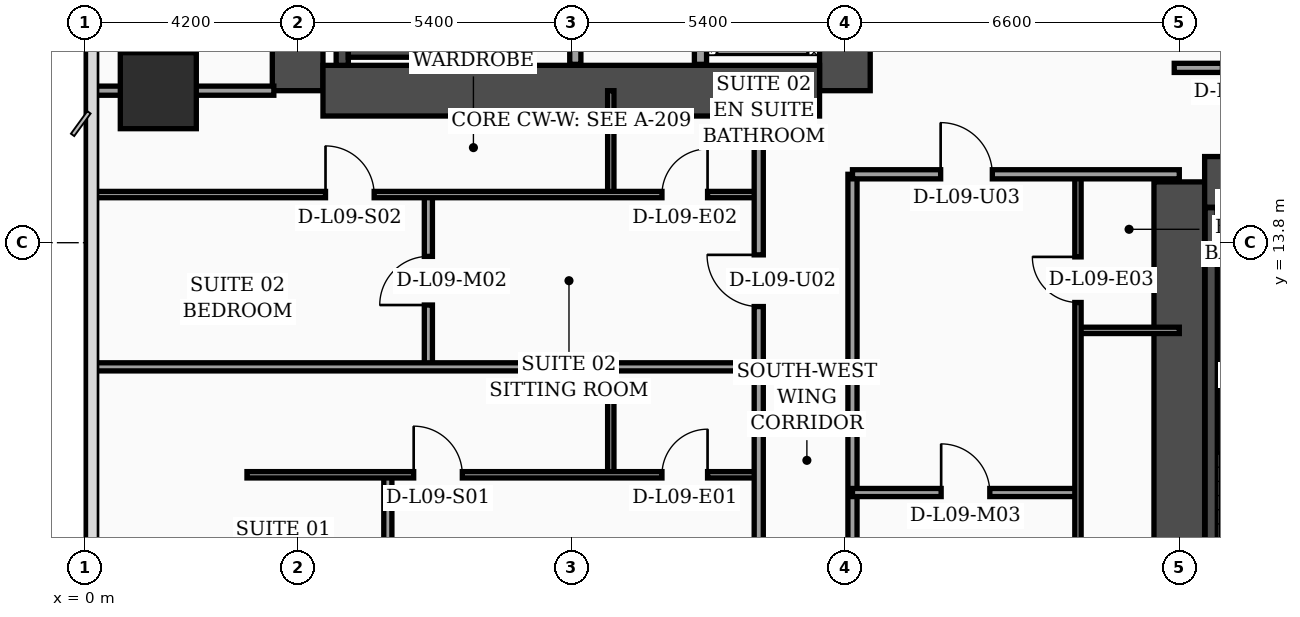
"""IFC4 building model, lengths in metres.
Left out: names, types, materials, properties, quantities, classifications, styles, units other than length and angle.
Written with IfcOpenShell. Run it as: python <this file> out.ifc"""

import sys

from ifc_helpers import new_model, si_unit, direction, frame, frame_2d, origin, origin_2d, place, context, subcontext, project, spatial, rectangle, extrude, element, fill, save


model = new_model("IFC4")
c1 = context("Model", 3, precision=1e-05, world=origin(), true_north=direction((0.0, 1.0)))
c2 = subcontext(c1, "Body", "Model", "MODEL_VIEW")
j1 = project(units=[si_unit("LENGTHUNIT", "METRE"), si_unit("PLANEANGLEUNIT", "RADIAN")], contexts=[c1])
p1 = place(None, origin())
s1 = spatial("IfcSite", under=j1, at=p1, CompositionType="ELEMENT")
p2 = place(p1, origin())
s2 = spatial("IfcBuilding", under=s1, at=p2, CompositionType="ELEMENT")
p3 = place(p2, frame((0.0, 0.0, 42.2)))
s3 = spatial("IfcBuildingStorey", under=s2, at=p3, CompositionType="ELEMENT", Elevation=42.2)
p4 = place(p3, frame((4.2, 16.8, 0.0), z_axis=(0.0, 0.0, 1.0), x_axis=(0.0, 1.0, 0.0)))
e1 = element("IfcWall", 1, at=p4, inside=s3, PredefinedType="SHEAR", context=c2, shape_type="SweptSolid", body=[
    extrude(rectangle(XDim=21.6, YDim=1.0, at=frame_2d((10.8, 0.0))), origin(), (0.0, 0.0, 1.0), 3.52),
])
p5 = place(p3, frame((15.0, 16.8, 0.0), z_axis=(0.0, 0.0, 1.0), x_axis=(0.0, 1.0, 0.0)))
e2 = element("IfcWall", 2, at=p5, inside=s3, PredefinedType="SHEAR", context=c2, shape_type="SweptSolid", body=[
    extrude(rectangle(XDim=21.6, YDim=1.0, at=frame_2d((10.8, 0.0))), origin(), (0.0, 0.0, 1.0), 3.52),
])
p6 = place(p5, frame((8.65, 0.0, 0.0)))
e3 = element("IfcOpeningElement", 3, at=p6, cuts=e2, PredefinedType="OPENING", context=c2, shape_type="SweptSolid", body=[
    extrude(rectangle(XDim=1.1, YDim=2.2, at=frame_2d((0.55, 1.1))), frame((0.0, 0.51, 0.0), z_axis=(0.0, -1.0, 0.0), x_axis=(1.0, 0.0, 0.0)), (0.0, 0.0, 1.0), 1.02),
])
p7 = place(p5, frame((1.25, 0.0, 0.0)))
e4 = element("IfcOpeningElement", 4, at=p7, cuts=e2, PredefinedType="OPENING", context=c2, shape_type="SweptSolid", body=[
    extrude(rectangle(XDim=1.1, YDim=2.2, at=frame_2d((0.55, 1.1))), frame((0.0, 0.51, 0.0), z_axis=(0.0, -1.0, 0.0), x_axis=(1.0, 0.0, 0.0)), (0.0, 0.0, 1.0), 1.02),
])
p8 = place(p5, frame((3.8, 0.0, 0.0)))
e5 = element("IfcOpeningElement", 5, at=p8, cuts=e2, PredefinedType="OPENING", context=c2, shape_type="SweptSolid", body=[
    extrude(rectangle(XDim=1.1, YDim=2.2, at=frame_2d((0.55, 1.1))), frame((0.0, 0.51, 0.0), z_axis=(0.0, -1.0, 0.0), x_axis=(1.0, 0.0, 0.0)), (0.0, 0.0, 1.0), 1.02),
])
p9 = place(p5, frame((6.35, 0.0, 0.0)))
e6 = element("IfcOpeningElement", 6, at=p9, cuts=e2, PredefinedType="OPENING", context=c2, shape_type="SweptSolid", body=[
    extrude(rectangle(XDim=1.1, YDim=2.2, at=frame_2d((0.55, 1.1))), frame((0.0, 0.51, 0.0), z_axis=(0.0, -1.0, 0.0), x_axis=(1.0, 0.0, 0.0)), (0.0, 0.0, 1.0), 1.02),
])
p10 = place(p3, frame((4.7, 16.8, 0.0), z_axis=(0.0, 0.0, 1.0), x_axis=(1.0, 0.0, 0.0)))
e7 = element("IfcWall", 7, at=p10, inside=s3, PredefinedType="SHEAR", context=c2, shape_type="SweptSolid", body=[
    extrude(rectangle(XDim=9.8, YDim=1.0, at=frame_2d((4.9, 0.0))), origin(), (0.0, 0.0, 1.0), 3.52),
])
p11 = place(p3, frame((21.6, 4.6, 0.0), z_axis=(0.0, 0.0, 1.0), x_axis=(0.0, 1.0, 0.0)))
e8 = element("IfcWall", 8, at=p11, inside=s3, PredefinedType="SHEAR", context=c2, shape_type="SweptSolid", body=[
    extrude(rectangle(XDim=10.4, YDim=1.0, at=frame_2d((5.2, 0.0))), origin(), (0.0, 0.0, 1.0), 3.52),
])
p12 = place(p3, frame((22.1, 15.0, 0.0), z_axis=(0.0, 0.0, 1.0), x_axis=(1.0, 0.0, 0.0)))
e9 = element("IfcWall", 9, at=p12, inside=s3, PredefinedType="SHEAR", context=c2, shape_type="SweptSolid", body=[
    extrude(rectangle(XDim=9.8, YDim=1.0, at=frame_2d((4.9, 0.0))), origin(), (0.0, 0.0, 1.0), 3.52),
])
p13 = place(p12, frame((4.8, 0.0, 0.0)))
e10 = element("IfcOpeningElement", 10, at=p13, cuts=e9, PredefinedType="OPENING", context=c2, shape_type="SweptSolid", body=[
    extrude(rectangle(XDim=1.1, YDim=2.2, at=frame_2d((0.55, 1.1))), frame((0.0, 0.51, 0.0), z_axis=(0.0, -1.0, 0.0), x_axis=(1.0, 0.0, 0.0)), (0.0, 0.0, 1.0), 1.02),
])
p14 = place(p3, frame((5.08, 17.3, 0.0), z_axis=(0.0, 0.0, 1.0), x_axis=(0.0, 1.0, 0.0)))
e11 = element("IfcWall", 11, at=p14, inside=s3, PredefinedType="SOLIDWALL", context=c2, shape_type="SweptSolid", body=[
    extrude(rectangle(XDim=9.49, YDim=0.24, at=frame_2d((4.745, 0.0))), origin(), (0.0, 0.0, 1.0), 3.52),
])
p15 = place(p3, frame((8.42, 17.3, 0.0), z_axis=(0.0, 0.0, 1.0), x_axis=(0.0, 1.0, 0.0)))
e12 = element("IfcWall", 12, at=p15, inside=s3, PredefinedType="SOLIDWALL", context=c2, shape_type="SweptSolid", body=[
    extrude(rectangle(XDim=9.49, YDim=0.24, at=frame_2d((4.745, 0.0))), origin(), (0.0, 0.0, 1.0), 3.52),
])
p16 = place(p15, frame((0.35, 0.0, 0.0)))
e13 = element("IfcOpeningElement", 13, at=p16, cuts=e12, PredefinedType="OPENING", context=c2, shape_type="SweptSolid", body=[
    extrude(rectangle(XDim=1.15, YDim=2.2, at=frame_2d((0.575, 1.1))), frame((0.0, 0.13, 0.0), z_axis=(0.0, -1.0, 0.0), x_axis=(1.0, 0.0, 0.0)), (0.0, 0.0, 1.0), 0.26),
])
p17 = place(p3, frame((5.2, 17.58, 0.0), z_axis=(0.0, 0.0, 1.0), x_axis=(1.0, 0.0, 0.0)))
e14 = element("IfcWall", 14, at=p17, inside=s3, PredefinedType="SOLIDWALL", context=c2, shape_type="SweptSolid", body=[
    extrude(rectangle(XDim=3.1, YDim=0.24, at=frame_2d((1.55, 0.0))), origin(), (0.0, 0.0, 1.0), 3.52),
])
p18 = place(p3, frame((22.23, 5.1, 0.0), z_axis=(0.0, 0.0, 1.0), x_axis=(0.0, 1.0, 0.0)))
e15 = element("IfcWall", 15, at=p18, inside=s3, PredefinedType="SOLIDWALL", context=c2, shape_type="SweptSolid", body=[
    extrude(rectangle(XDim=9.39, YDim=0.24, at=frame_2d((4.695, 0.0))), origin(), (0.0, 0.0, 1.0), 3.52),
])
p19 = place(p3, frame((22.35, 14.37, 0.0), z_axis=(0.0, 0.0, 1.0), x_axis=(1.0, 0.0, 0.0)))
e16 = element("IfcWall", 16, at=p19, inside=s3, PredefinedType="SOLIDWALL", context=c2, shape_type="SweptSolid", body=[
    extrude(rectangle(XDim=3.1, YDim=0.24, at=frame_2d((1.55, 0.0))), origin(), (0.0, 0.0, 1.0), 3.52),
])
p20 = place(p3, frame((1.45, 16.8, 0.0), z_axis=(0.0, 0.0, 1.0), x_axis=(1.0, 0.0, 0.0)))
e17 = element("IfcColumn", 17, at=p20, inside=s3, PredefinedType="COLUMN", context=c2, shape_type="SweptSolid", body=[
    extrude(rectangle(XDim=1.5, YDim=1.5, at=origin_2d()), origin(), (0.0, 0.0, 1.0), 3.52),
])
p21 = place(p3, frame((9.68, 17.32, 0.0), z_axis=(0.0, 0.0, 1.0), x_axis=(0.0, 1.0, 0.0)))
e18 = element("IfcWall", 18, at=p21, inside=s3, PredefinedType="SOLIDWALL", context=c2, shape_type="SweptSolid", body=[
    extrude(rectangle(XDim=7.68, YDim=0.22, at=frame_2d((3.84, 0.0))), origin(), (0.0, 0.0, 1.0), 3.52),
])
p22 = place(p3, frame((12.15, 17.32, 0.0), z_axis=(0.0, 0.0, 1.0), x_axis=(0.0, 1.0, 0.0)))
e19 = element("IfcWall", 19, at=p22, inside=s3, PredefinedType="SOLIDWALL", context=c2, shape_type="SweptSolid", body=[
    extrude(rectangle(XDim=7.65, YDim=0.24, at=frame_2d((3.825, 0.0))), origin(), (0.0, 0.0, 1.0), 3.52),
])
p23 = place(p3, frame((0.08, 16.8, 0.0), z_axis=(0.0, 0.0, 1.0), x_axis=(1.0, 0.0, 0.0)))
e20 = element("IfcWall", 20, at=p23, inside=s3, PredefinedType="PARTITIONING", context=c2, shape_type="SweptSolid", body=[
    extrude(rectangle(XDim=3.65, YDim=0.18, at=frame_2d((1.825, 0.0))), origin(), (0.0, 0.0, 1.0), 2.82),
])
p24 = place(p3, frame((10.38, 9.22, 0.0), z_axis=(0.0, 0.0, 1.0), x_axis=(0.0, 1.0, 0.0)))
e21 = element("IfcWall", 21, at=p24, inside=s3, PredefinedType="PARTITIONING", context=c2, shape_type="SweptSolid", body=[
    extrude(rectangle(XDim=2.13, YDim=0.125, at=frame_2d((1.065, 0.0))), origin(), (0.0, 0.0, 1.0), 3.12),
])
p25 = place(p3, frame((5.98, 2.44, 0.0), z_axis=(0.0, 0.0, 1.0), x_axis=(0.0, 1.0, 0.0)))
e22 = element("IfcWall", 22, at=p25, inside=s3, PredefinedType="PARTITIONING", context=c2, shape_type="SweptSolid", body=[
    extrude(rectangle(XDim=6.78, YDim=0.16, at=frame_2d((3.39, 0.0))), origin(), (0.0, 0.0, 1.0), 3.02),
])
p26 = place(p25, frame((2.91, 0.0, 0.0)))
e23 = element("IfcOpeningElement", 23, at=p26, cuts=e22, PredefinedType="OPENING", context=c2, shape_type="SweptSolid", body=[
    extrude(rectangle(XDim=0.96, YDim=2.2, at=frame_2d((0.48, 1.1))), frame((0.0, 0.09, 0.0), z_axis=(0.0, -1.0, 0.0), x_axis=(1.0, 0.0, 0.0)), (0.0, 0.0, 1.0), 0.18),
])
p27 = place(p3, frame((3.2, 9.22, 0.0), z_axis=(0.0, 0.0, 1.0), x_axis=(1.0, 0.0, 0.0)))
e24 = element("IfcWall", 24, at=p27, inside=s3, PredefinedType="PARTITIONING", context=c2, shape_type="SweptSolid", body=[
    extrude(rectangle(XDim=10.1, YDim=0.125, at=frame_2d((5.05, 0.0))), origin(), (0.0, 0.0, 1.0), 2.82),
])
p28 = place(p27, frame((3.29, 0.0, 0.0)))
e25 = element("IfcOpeningElement", 25, at=p28, cuts=e24, PredefinedType="OPENING", context=c2, shape_type="SweptSolid", body=[
    extrude(rectangle(XDim=0.96, YDim=2.2, at=frame_2d((0.48, 1.1))), frame((0.0, 0.073, 0.0), z_axis=(0.0, -1.0, 0.0), x_axis=(1.0, 0.0, 0.0)), (0.0, 0.0, 1.0), 0.145),
])
p29 = place(p27, frame((8.19, 0.0, 0.0)))
e26 = element("IfcOpeningElement", 26, at=p29, cuts=e24, PredefinedType="OPENING", context=c2, shape_type="SweptSolid", body=[
    extrude(rectangle(XDim=0.9, YDim=2.15, at=frame_2d((0.45, 1.075))), frame((0.0, 0.073, 0.0), z_axis=(0.0, -1.0, 0.0), x_axis=(1.0, 0.0, 0.0)), (0.0, 0.0, 1.0), 0.145),
])
p30 = place(p3, frame((10.38, 14.75, 0.0), z_axis=(0.0, 0.0, 1.0), x_axis=(0.0, 1.0, 0.0)))
e27 = element("IfcWall", 27, at=p30, inside=s3, PredefinedType="PARTITIONING", context=c2, shape_type="SweptSolid", body=[
    extrude(rectangle(XDim=2.05, YDim=0.125, at=frame_2d((1.025, 0.0))), origin(), (0.0, 0.0, 1.0), 3.52),
])
p31 = place(p3, frame((6.78, 11.35, 0.0), z_axis=(0.0, 0.0, 1.0), x_axis=(0.0, 1.0, 0.0)))
e28 = element("IfcWall", 28, at=p31, inside=s3, PredefinedType="PARTITIONING", context=c2, shape_type="SweptSolid", body=[
    extrude(rectangle(XDim=3.4, YDim=0.16, at=frame_2d((1.7, 0.0))), origin(), (0.0, 0.0, 1.0), 3.52),
])
p32 = place(p31, frame((1.22, 0.0, 0.0)))
e29 = element("IfcOpeningElement", 29, at=p32, cuts=e28, PredefinedType="OPENING", context=c2, shape_type="SweptSolid", body=[
    extrude(rectangle(XDim=0.96, YDim=2.2, at=frame_2d((0.48, 1.1))), frame((0.0, 0.09, 0.0), z_axis=(0.0, -1.0, 0.0), x_axis=(1.0, 0.0, 0.0)), (0.0, 0.0, 1.0), 0.18),
])
p33 = place(p3, frame((0.08, 14.75, 0.0), z_axis=(0.0, 0.0, 1.0), x_axis=(1.0, 0.0, 0.0)))
e30 = element("IfcWall", 30, at=p33, inside=s3, PredefinedType="PARTITIONING", context=c2, shape_type="SweptSolid", body=[
    extrude(rectangle(XDim=13.22, YDim=0.125, at=frame_2d((6.61, 0.0))), origin(), (0.0, 0.0, 1.0), 2.82),
])
p34 = place(p33, frame((4.67, 0.0, 0.0)))
e31 = element("IfcOpeningElement", 31, at=p34, cuts=e30, PredefinedType="OPENING", context=c2, shape_type="SweptSolid", body=[
    extrude(rectangle(XDim=0.96, YDim=2.2, at=frame_2d((0.48, 1.1))), frame((0.0, 0.073, 0.0), z_axis=(0.0, -1.0, 0.0), x_axis=(1.0, 0.0, 0.0)), (0.0, 0.0, 1.0), 0.145),
])
p35 = place(p33, frame((11.31, 0.0, 0.0)))
e32 = element("IfcOpeningElement", 32, at=p35, cuts=e30, PredefinedType="OPENING", context=c2, shape_type="SweptSolid", body=[
    extrude(rectangle(XDim=0.9, YDim=2.15, at=frame_2d((0.45, 1.075))), frame((0.0, 0.073, 0.0), z_axis=(0.0, -1.0, 0.0), x_axis=(1.0, 0.0, 0.0)), (0.0, 0.0, 1.0), 0.145),
])
p36 = place(p3, frame((0.08, 11.35, 0.0), z_axis=(0.0, 0.0, 1.0), x_axis=(1.0, 0.0, 0.0)))
e33 = element("IfcWall", 33, at=p36, inside=s3, PredefinedType="PARTITIONING", context=c2, shape_type="SweptSolid", body=[
    extrude(rectangle(XDim=13.22, YDim=0.16, at=frame_2d((6.61, 0.0))), origin(), (0.0, 0.0, 1.0), 2.82),
])
p37 = place(p3, frame((13.3, 2.44, 0.0), z_axis=(0.0, 0.0, 1.0), x_axis=(0.0, 1.0, 0.0)))
e34 = element("IfcWall", 34, at=p37, inside=s3, PredefinedType="PARTITIONING", context=c2, shape_type="SweptSolid", body=[
    extrude(rectangle(XDim=14.36, YDim=0.18, at=frame_2d((7.18, 0.0))), origin(), (0.0, 0.0, 1.0), 3.02),
])
p38 = place(p37, frame((3.01, 0.0, 0.0)))
e35 = element("IfcOpeningElement", 35, at=p38, cuts=e34, PredefinedType="OPENING", context=c2, shape_type="SweptSolid", body=[
    extrude(rectangle(XDim=1.02, YDim=2.2, at=frame_2d((0.51, 1.1))), frame((0.0, 0.1, 0.0), z_axis=(0.0, -1.0, 0.0), x_axis=(1.0, 0.0, 0.0)), (0.0, 0.0, 1.0), 0.2),
])
p39 = place(p37, frame((10.1, 0.0, 0.0)))
e36 = element("IfcOpeningElement", 36, at=p39, cuts=e34, PredefinedType="OPENING", context=c2, shape_type="SweptSolid", body=[
    extrude(rectangle(XDim=1.02, YDim=2.2, at=frame_2d((0.51, 1.1))), frame((0.0, 0.1, 0.0), z_axis=(0.0, -1.0, 0.0), x_axis=(1.0, 0.0, 0.0)), (0.0, 0.0, 1.0), 0.2),
])
p40 = place(p3, frame((15.15, 2.44, 0.0), z_axis=(0.0, 0.0, 1.0), x_axis=(0.0, 1.0, 0.0)))
e37 = element("IfcWall", 37, at=p40, inside=s3, PredefinedType="PARTITIONING", context=c2, shape_type="SweptSolid", body=[
    extrude(rectangle(XDim=12.71, YDim=0.18, at=frame_2d((6.355, 0.0))), origin(), (0.0, 0.0, 1.0), 3.02),
])
p41 = place(p3, frame((19.6, 12.07, 0.0), z_axis=(0.0, 0.0, 1.0), x_axis=(1.0, 0.0, 0.0)))
e38 = element("IfcWall", 38, at=p41, inside=s3, PredefinedType="PARTITIONING", context=c2, shape_type="SweptSolid", body=[
    extrude(rectangle(XDim=2.0, YDim=0.125, at=frame_2d((1.0, 0.0))), origin(), (0.0, 0.0, 1.0), 3.52),
])
p42 = place(p3, frame((15.15, 8.87, 0.0), z_axis=(0.0, 0.0, 1.0), x_axis=(1.0, 0.0, 0.0)))
e39 = element("IfcWall", 39, at=p42, inside=s3, PredefinedType="PARTITIONING", context=c2, shape_type="SweptSolid", body=[
    extrude(rectangle(XDim=4.45, YDim=0.16, at=frame_2d((2.225, 0.0))), origin(), (0.0, 0.0, 1.0), 3.52),
])
p43 = place(p42, frame((1.75, 0.0, 0.0)))
e40 = element("IfcOpeningElement", 40, at=p43, cuts=e39, PredefinedType="OPENING", context=c2, shape_type="SweptSolid", body=[
    extrude(rectangle(XDim=0.96, YDim=2.2, at=frame_2d((0.48, 1.1))), frame((0.0, 0.09, 0.0), z_axis=(0.0, -1.0, 0.0), x_axis=(1.0, 0.0, 0.0)), (0.0, 0.0, 1.0), 0.18),
])
p44 = place(p3, frame((19.6, 2.44, 0.0), z_axis=(0.0, 0.0, 1.0), x_axis=(0.0, 1.0, 0.0)))
e41 = element("IfcWall", 41, at=p44, inside=s3, PredefinedType="PARTITIONING", context=c2, shape_type="SweptSolid", body=[
    extrude(rectangle(XDim=12.71, YDim=0.125, at=frame_2d((6.355, 0.0))), origin(), (0.0, 0.0, 1.0), 2.32),
])
p45 = place(p44, frame((4.34, 0.0, 0.0)))
e42 = element("IfcOpeningElement", 42, at=p45, cuts=e41, PredefinedType="OPENING", context=c2, shape_type="SweptSolid", body=[
    extrude(rectangle(XDim=0.96, YDim=2.2, at=frame_2d((0.48, 1.1))), frame((0.0, 0.073, 0.0), z_axis=(0.0, -1.0, 0.0), x_axis=(1.0, 0.0, 0.0)), (0.0, 0.0, 1.0), 0.145),
])
p46 = place(p44, frame((10.18, 0.0, 0.0)))
e43 = element("IfcOpeningElement", 43, at=p46, cuts=e41, PredefinedType="OPENING", context=c2, shape_type="SweptSolid", body=[
    extrude(rectangle(XDim=0.9, YDim=2.15, at=frame_2d((0.45, 1.075))), frame((0.0, 0.073, 0.0), z_axis=(0.0, -1.0, 0.0), x_axis=(1.0, 0.0, 0.0)), (0.0, 0.0, 1.0), 0.145),
])
p47 = place(p3, frame((15.15, 15.15, 0.0), z_axis=(0.0, 0.0, 1.0), x_axis=(1.0, 0.0, 0.0)))
e44 = element("IfcWall", 44, at=p47, inside=s3, PredefinedType="PARTITIONING", context=c2, shape_type="SweptSolid", body=[
    extrude(rectangle(XDim=6.45, YDim=0.18, at=frame_2d((3.225, 0.0))), origin(), (0.0, 0.0, 1.0), 2.32),
])
p48 = place(p47, frame((1.74, 0.0, 0.0)))
e45 = element("IfcOpeningElement", 45, at=p48, cuts=e44, PredefinedType="OPENING", context=c2, shape_type="SweptSolid", body=[
    extrude(rectangle(XDim=1.02, YDim=2.2, at=frame_2d((0.51, 1.1))), frame((0.0, 0.1, 0.0), z_axis=(0.0, -1.0, 0.0), x_axis=(1.0, 0.0, 0.0)), (0.0, 0.0, 1.0), 0.2),
])
p49 = place(p3, frame((21.5, 17.25, 0.0), z_axis=(0.0, 0.0, 1.0), x_axis=(1.0, 0.0, 0.0)))
e46 = element("IfcWall", 46, at=p49, inside=s3, PredefinedType="PARTITIONING", context=c2, shape_type="SweptSolid", body=[
    extrude(rectangle(XDim=15.75, YDim=0.18, at=frame_2d((7.875, 0.0))), origin(), (0.0, 0.0, 1.0), 2.82),
])
p50 = place(p49, frame((0.95, 0.0, 0.0)))
e47 = element("IfcOpeningElement", 47, at=p50, cuts=e46, PredefinedType="OPENING", context=c2, shape_type="SweptSolid", body=[
    extrude(rectangle(XDim=1.02, YDim=2.2, at=frame_2d((0.51, 1.1))), frame((0.0, 0.1, 0.0), z_axis=(0.0, -1.0, 0.0), x_axis=(1.0, 0.0, 0.0)), (0.0, 0.0, 1.0), 0.2),
])
p51 = place(p49, frame((8.78, 0.0, 0.0)))
e48 = element("IfcOpeningElement", 48, at=p51, cuts=e46, PredefinedType="OPENING", context=c2, shape_type="SweptSolid", body=[
    extrude(rectangle(XDim=1.02, YDim=2.2, at=frame_2d((0.51, 1.1))), frame((0.0, 0.1, 0.0), z_axis=(0.0, -1.0, 0.0), x_axis=(1.0, 0.0, 0.0)), (0.0, 0.0, 1.0), 0.2),
])
p52 = place(p28, origin())
e49 = element("IfcDoor", 49, at=p52, inside=s3, OperationType="SINGLE_SWING_LEFT", PredefinedType="DOOR", context=c2, shape_type="SweptSolid", body=[
    extrude(rectangle(XDim=0.96, YDim=2.2, at=frame_2d((0.48, 1.1))), frame((0.0, 0.025, 0.0), z_axis=(0.0, -1.0, 0.0), x_axis=(1.0, 0.0, 0.0)), (0.0, 0.0, 1.0), 0.05),
])
fill(e25, e49)
p53 = place(p29, origin())
e50 = element("IfcDoor", 50, at=p53, inside=s3, OperationType="SINGLE_SWING_RIGHT", PredefinedType="DOOR", context=c2, shape_type="SweptSolid", body=[
    extrude(rectangle(XDim=0.9, YDim=2.15, at=frame_2d((0.45, 1.075))), frame((0.0, 0.025, 0.0), z_axis=(0.0, -1.0, 0.0), x_axis=(1.0, 0.0, 0.0)), (0.0, 0.0, 1.0), 0.05),
])
fill(e26, e50)
p54 = place(p32, origin())
e51 = element("IfcDoor", 51, at=p54, inside=s3, OperationType="SINGLE_SWING_LEFT", PredefinedType="DOOR", context=c2, shape_type="SweptSolid", body=[
    extrude(rectangle(XDim=0.96, YDim=2.2, at=frame_2d((0.48, 1.1))), frame((0.0, 0.025, 0.0), z_axis=(0.0, -1.0, 0.0), x_axis=(1.0, 0.0, 0.0)), (0.0, 0.0, 1.0), 0.05),
])
fill(e29, e51)
p55 = place(p34, origin())
e52 = element("IfcDoor", 52, at=p55, inside=s3, OperationType="SINGLE_SWING_LEFT", PredefinedType="DOOR", context=c2, shape_type="SweptSolid", body=[
    extrude(rectangle(XDim=0.96, YDim=2.2, at=frame_2d((0.48, 1.1))), frame((0.0, 0.025, 0.0), z_axis=(0.0, -1.0, 0.0), x_axis=(1.0, 0.0, 0.0)), (0.0, 0.0, 1.0), 0.05),
])
fill(e31, e52)
p56 = place(p35, origin())
e53 = element("IfcDoor", 53, at=p56, inside=s3, OperationType="SINGLE_SWING_RIGHT", PredefinedType="DOOR", context=c2, shape_type="SweptSolid", body=[
    extrude(rectangle(XDim=0.9, YDim=2.15, at=frame_2d((0.45, 1.075))), frame((0.0, 0.025, 0.0), z_axis=(0.0, -1.0, 0.0), x_axis=(1.0, 0.0, 0.0)), (0.0, 0.0, 1.0), 0.05),
])
fill(e32, e53)
p57 = place(p39, origin())
e54 = element("IfcDoor", 54, at=p57, inside=s3, OperationType="SINGLE_SWING_RIGHT", PredefinedType="DOOR", context=c2, shape_type="SweptSolid", body=[
    extrude(rectangle(XDim=1.02, YDim=2.2, at=frame_2d((0.51, 1.1))), frame((0.0, 0.025, 0.0), z_axis=(0.0, -1.0, 0.0), x_axis=(1.0, 0.0, 0.0)), (0.0, 0.0, 1.0), 0.05),
])
fill(e36, e54)
p58 = place(p43, origin())
e55 = element("IfcDoor", 55, at=p58, inside=s3, OperationType="SINGLE_SWING_LEFT", PredefinedType="DOOR", context=c2, shape_type="SweptSolid", body=[
    extrude(rectangle(XDim=0.96, YDim=2.2, at=frame_2d((0.48, 1.1))), frame((0.0, 0.025, 0.0), z_axis=(0.0, -1.0, 0.0), x_axis=(1.0, 0.0, 0.0)), (0.0, 0.0, 1.0), 0.05),
])
fill(e40, e55)
p59 = place(p46, origin())
e56 = element("IfcDoor", 56, at=p59, inside=s3, OperationType="SINGLE_SWING_RIGHT", PredefinedType="DOOR", context=c2, shape_type="SweptSolid", body=[
    extrude(rectangle(XDim=0.9, YDim=2.15, at=frame_2d((0.45, 1.075))), frame((0.0, 0.025, 0.0), z_axis=(0.0, -1.0, 0.0), x_axis=(1.0, 0.0, 0.0)), (0.0, 0.0, 1.0), 0.05),
])
fill(e43, e56)
p60 = place(p48, origin())
e57 = element("IfcDoor", 57, at=p60, inside=s3, OperationType="SINGLE_SWING_LEFT", PredefinedType="DOOR", context=c2, shape_type="SweptSolid", body=[
    extrude(rectangle(XDim=1.02, YDim=2.2, at=frame_2d((0.51, 1.1))), frame((0.0, 0.025, 0.0), z_axis=(0.0, -1.0, 0.0), x_axis=(1.0, 0.0, 0.0)), (0.0, 0.0, 1.0), 0.05),
])
fill(e45, e57)
save(model, sys.argv[1])
